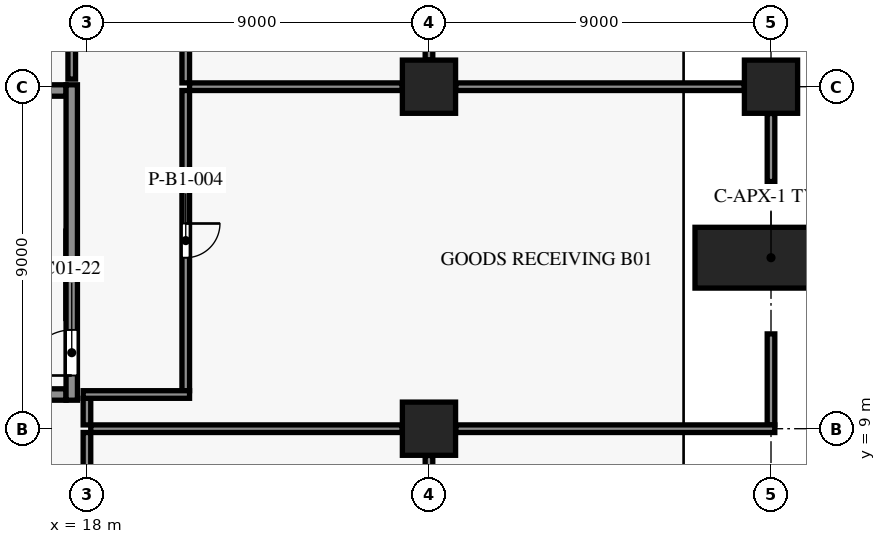
"""IFC4 building model, lengths in metres.
Left out: names, types, materials, properties, quantities, classifications, styles, units other than length and angle.
Written with IfcOpenShell. Run it as: python <this file> out.ifc"""

import sys

from ifc_helpers import new_model, si_unit, direction, frame, frame_2d, origin, origin_2d, place, context, subcontext, project, spatial, rectangle, extrude, element, fill, save


model = new_model("IFC4")
c1 = context("Model", 3, precision=1e-05, world=origin(), true_north=direction((0.0, 1.0)))
c2 = subcontext(c1, "Body", "Model", "MODEL_VIEW")
j1 = project(units=[si_unit("LENGTHUNIT", "METRE"), si_unit("PLANEANGLEUNIT", "RADIAN")], contexts=[c1])
p1 = place(None, origin())
s1 = spatial("IfcSite", under=j1, at=p1, CompositionType="ELEMENT")
p2 = place(p1, origin())
s2 = spatial("IfcBuilding", under=s1, at=p2, CompositionType="ELEMENT")
p3 = place(p2, frame((0.0, 0.0, -6.0)))
s3 = spatial("IfcBuildingStorey", under=s2, at=p3, CompositionType="ELEMENT", Elevation=-6.0)
for number, where, z_axis, x_axis in (
    (1, (27.0, 9.0, 0.0), (0.0, 0.0, 1.0), (1.0, 0.0, 0.0)),
    (2, (27.0, 18.0, 0.0), (0.0, 0.0, 1.0), (1.0, 0.0, 0.0)),
):
    element("IfcColumn", number, at=place(p3, frame(where, z_axis=z_axis, x_axis=x_axis)), inside=s3, PredefinedType="COLUMN", context=c2, shape_type="SweptSolid", body=[
        extrude(rectangle(XDim=1.4, YDim=1.4, at=origin_2d()), origin(), (0.0, 0.0, 1.0), 6.0),
    ])
for number, where, z_axis, x_axis in (
    (3, (36.0, 13.5, 0.0), (0.0, 0.0, 1.0), (0.0, 1.0, 0.0)),
    (4, (36.0, 6.75, 0.0), (0.0, 0.0, 1.0), (0.0, 1.0, 0.0)),
):
    element("IfcColumn", number, at=place(p3, frame(where, z_axis=z_axis, x_axis=x_axis)), inside=s3, PredefinedType="COLUMN", context=c2, shape_type="SweptSolid", body=[
        extrude(rectangle(XDim=4.0, YDim=1.6, at=origin_2d()), origin(), (0.0, 0.0, 1.0), 6.0),
    ])
p4 = place(p3, frame((36.0, 18.0, 0.0), z_axis=(0.0, 0.0, 1.0), x_axis=(1.0, 0.0, 0.0)))
e5 = element("IfcColumn", 5, at=p4, inside=s3, PredefinedType="COLUMN", context=c2, shape_type="SweptSolid", body=[
    extrude(rectangle(XDim=1.4, YDim=1.4, at=origin_2d()), origin(), (0.0, 0.0, 1.0), 6.0),
])
for number, where, z_axis, x_axis in (
    (6, (14.15, 9.9, 0.0), (0.0, 0.0, 1.0), (1.0, 0.0, 0.0)),
    (7, (14.15, 17.9, 0.0), (0.0, 0.0, 1.0), (1.0, 0.0, 0.0)),
):
    element("IfcWall", number, at=place(p3, frame(where, z_axis=z_axis, x_axis=x_axis)), inside=s3, PredefinedType="SHEAR", context=c2, shape_type="SweptSolid", body=[
        extrude(rectangle(XDim=3.3, YDim=0.3, at=frame_2d((1.65, 0.0))), origin(), (0.0, 0.0, 1.0), 5.6),
    ])
p5 = place(p3, frame((17.6, 9.75, 0.0), z_axis=(0.0, 0.0, 1.0), x_axis=(0.0, 1.0, 0.0)))
e8 = element("IfcWall", 8, at=p5, inside=s3, PredefinedType="SHEAR", context=c2, shape_type="SweptSolid", body=[
    extrude(rectangle(XDim=8.3, YDim=0.3, at=frame_2d((4.15, 0.0))), origin(), (0.0, 0.0, 1.0), 5.6),
])
p6 = place(p5, frame((0.65, 0.0, 0.0)))
e9 = element("IfcOpeningElement", 9, at=p6, cuts=e8, PredefinedType="OPENING", context=c2, shape_type="SweptSolid", body=[
    extrude(rectangle(XDim=1.2, YDim=2.2, at=frame_2d((0.6, 1.1))), frame((0.0, 0.16, 0.0), z_axis=(0.0, -1.0, 0.0), x_axis=(1.0, 0.0, 0.0)), (0.0, 0.0, 1.0), 0.32),
])
p7 = place(p3, frame((18.0, 7.6, 0.0), z_axis=(0.0, 0.0, 1.0), x_axis=(0.0, 1.0, 0.0)))
e10 = element("IfcWall", 10, at=p7, inside=s3, PredefinedType="PARTITIONING", context=c2, shape_type="SweptSolid", body=[
    extrude(rectangle(XDim=1.3, YDim=0.2, at=frame_2d((0.65, 0.0))), origin(), (0.0, 0.0, 1.0), 5.58),
])
p8 = place(p3, frame((27.0, 8.295, 0.0), z_axis=(0.0, 0.0, 1.0), x_axis=(0.0, -1.0, 0.0)))
e11 = element("IfcWall", 11, at=p8, inside=s3, PredefinedType="PARTITIONING", context=c2, shape_type="SweptSolid", body=[
    extrude(rectangle(XDim=3.09, YDim=0.2, at=frame_2d((1.545, 0.0))), origin(), (0.0, 0.0, 1.0), 5.58),
])
p9 = place(p3, frame((18.1, 9.0, 0.0), z_axis=(0.0, 0.0, 1.0), x_axis=(1.0, 0.0, 0.0)))
e12 = element("IfcWall", 12, at=p9, inside=s3, PredefinedType="PARTITIONING", context=c2, shape_type="SweptSolid", body=[
    extrude(rectangle(XDim=8.195, YDim=0.2, at=frame_2d((4.097, 0.0))), origin(), (0.0, 0.0, 1.0), 5.58),
])
p10 = place(p3, frame((36.1, 9.0, 0.0), z_axis=(0.0, 0.0, 1.0), x_axis=(-1.0, 0.0, 0.0)))
e13 = element("IfcWall", 13, at=p10, inside=s3, PredefinedType="PARTITIONING", context=c2, shape_type="SweptSolid", body=[
    extrude(rectangle(XDim=8.395, YDim=0.2, at=frame_2d((4.198, 0.0))), origin(), (0.0, 0.0, 1.0), 5.58),
])
p11 = place(p3, frame((18.0, 9.1, 0.0), z_axis=(0.0, 0.0, 1.0), x_axis=(0.0, 1.0, 0.0)))
e14 = element("IfcWall", 14, at=p11, inside=s3, PredefinedType="PARTITIONING", context=c2, shape_type="SweptSolid", body=[
    extrude(rectangle(XDim=0.7, YDim=0.2, at=frame_2d((0.35, 0.0))), origin(), (0.0, 0.0, 1.0), 5.58),
])
p12 = place(p3, frame((20.7, 9.9, 0.0), z_axis=(0.0, 0.0, 1.0), x_axis=(-1.0, 0.0, 0.0)))
e15 = element("IfcWall", 15, at=p12, inside=s3, PredefinedType="PARTITIONING", context=c2, shape_type="SweptSolid", body=[
    extrude(rectangle(XDim=2.8, YDim=0.2, at=frame_2d((1.4, 0.0))), origin(), (0.0, 0.0, 1.0), 5.58),
])
p13 = place(p3, frame((36.0, 11.495, 0.0), z_axis=(0.0, 0.0, 1.0), x_axis=(0.0, -1.0, 0.0)))
e16 = element("IfcWall", 16, at=p13, inside=s3, PredefinedType="PARTITIONING", context=c2, shape_type="SweptSolid", body=[
    extrude(rectangle(XDim=2.395, YDim=0.2, at=frame_2d((1.198, 0.0))), origin(), (0.0, 0.0, 1.0), 5.58),
])
p14 = place(p3, frame((36.0, 17.295, 0.0), z_axis=(0.0, 0.0, 1.0), x_axis=(0.0, -1.0, 0.0)))
e17 = element("IfcWall", 17, at=p14, inside=s3, PredefinedType="PARTITIONING", context=c2, shape_type="SweptSolid", body=[
    extrude(rectangle(XDim=1.79, YDim=0.2, at=frame_2d((0.895, 0.0))), origin(), (0.0, 0.0, 1.0), 5.58),
])
p15 = place(p3, frame((20.6, 17.9, 0.0), z_axis=(0.0, 0.0, 1.0), x_axis=(0.0, -1.0, 0.0)))
e18 = element("IfcWall", 18, at=p15, inside=s3, PredefinedType="PARTITIONING", context=c2, shape_type="SweptSolid", body=[
    extrude(rectangle(XDim=7.9, YDim=0.2, at=frame_2d((3.95, 0.0))), origin(), (0.0, 0.0, 1.0), 5.58),
])
p16 = place(p15, frame((3.5, 0.0, 0.0)))
e19 = element("IfcOpeningElement", 19, at=p16, cuts=e18, PredefinedType="OPENING", context=c2, shape_type="SweptSolid", body=[
    extrude(rectangle(XDim=0.9, YDim=2.1, at=frame_2d((0.45, 1.05))), frame((0.0, 0.11, 0.0), z_axis=(0.0, -1.0, 0.0), x_axis=(1.0, 0.0, 0.0)), (0.0, 0.0, 1.0), 0.22),
])
p17 = place(p3, frame((20.7, 18.0, 0.0), z_axis=(0.0, 0.0, 1.0), x_axis=(1.0, 0.0, 0.0)))
e20 = element("IfcWall", 20, at=p17, inside=s3, PredefinedType="PARTITIONING", context=c2, shape_type="SweptSolid", body=[
    extrude(rectangle(XDim=5.595, YDim=0.2, at=frame_2d((2.797, 0.0))), origin(), (0.0, 0.0, 1.0), 5.58),
])
p18 = place(p3, frame((27.705, 18.0, 0.0), z_axis=(0.0, 0.0, 1.0), x_axis=(1.0, 0.0, 0.0)))
e21 = element("IfcWall", 21, at=p18, inside=s3, PredefinedType="PARTITIONING", context=c2, shape_type="SweptSolid", body=[
    extrude(rectangle(XDim=7.59, YDim=0.2, at=frame_2d((3.795, 0.0))), origin(), (0.0, 0.0, 1.0), 5.58),
])
p19 = place(p3, frame((17.6, 18.2, 0.0), z_axis=(0.0, 0.0, 1.0), x_axis=(0.0, 1.0, 0.0)))
e22 = element("IfcWall", 22, at=p19, inside=s3, PredefinedType="PARTITIONING", context=c2, shape_type="SweptSolid", body=[
    extrude(rectangle(XDim=8.095, YDim=0.2, at=frame_2d((4.047, 0.0))), origin(), (0.0, 0.0, 1.0), 5.58),
])
p20 = place(p3, frame((27.0, 26.295, 0.0), z_axis=(0.0, 0.0, 1.0), x_axis=(0.0, -1.0, 0.0)))
e23 = element("IfcWall", 23, at=p20, inside=s3, PredefinedType="PARTITIONING", context=c2, shape_type="SweptSolid", body=[
    extrude(rectangle(XDim=7.59, YDim=0.2, at=frame_2d((3.795, 0.0))), origin(), (0.0, 0.0, 1.0), 5.58),
])
p21 = place(p3, frame((20.6, 26.9, 0.0), z_axis=(0.0, 0.0, 1.0), x_axis=(0.0, -1.0, 0.0)))
e24 = element("IfcWall", 24, at=p21, inside=s3, PredefinedType="PARTITIONING", context=c2, shape_type="SweptSolid", body=[
    extrude(rectangle(XDim=8.8, YDim=0.2, at=frame_2d((4.4, 0.0))), origin(), (0.0, 0.0, 1.0), 5.58),
])
p22 = place(p21, frame((3.9, 0.0, 0.0)))
e25 = element("IfcOpeningElement", 25, at=p22, cuts=e24, PredefinedType="OPENING", context=c2, shape_type="SweptSolid", body=[
    extrude(rectangle(XDim=1.0, YDim=2.1, at=frame_2d((0.5, 1.05))), frame((0.0, 0.11, 0.0), z_axis=(0.0, -1.0, 0.0), x_axis=(1.0, 0.0, 0.0)), (0.0, 0.0, 1.0), 0.22),
])
p23 = place(p6, origin())
e26 = element("IfcDoor", 26, at=p23, inside=s3, OperationType="SINGLE_SWING_LEFT", PredefinedType="DOOR", context=c2, shape_type="SweptSolid", body=[
    extrude(rectangle(XDim=1.2, YDim=2.2, at=frame_2d((0.6, 1.1))), frame((0.0, 0.025, 0.0), z_axis=(0.0, -1.0, 0.0), x_axis=(1.0, 0.0, 0.0)), (0.0, 0.0, 1.0), 0.05),
])
fill(e9, e26)
p24 = place(p16, origin())
e27 = element("IfcDoor", 27, at=p24, inside=s3, OperationType="SINGLE_SWING_RIGHT", PredefinedType="DOOR", context=c2, shape_type="SweptSolid", body=[
    extrude(rectangle(XDim=0.9, YDim=2.1, at=frame_2d((0.45, 1.05))), frame((0.0, 0.025, 0.0), z_axis=(0.0, -1.0, 0.0), x_axis=(1.0, 0.0, 0.0)), (0.0, 0.0, 1.0), 0.05),
])
fill(e19, e27)
save(model, sys.argv[1])
